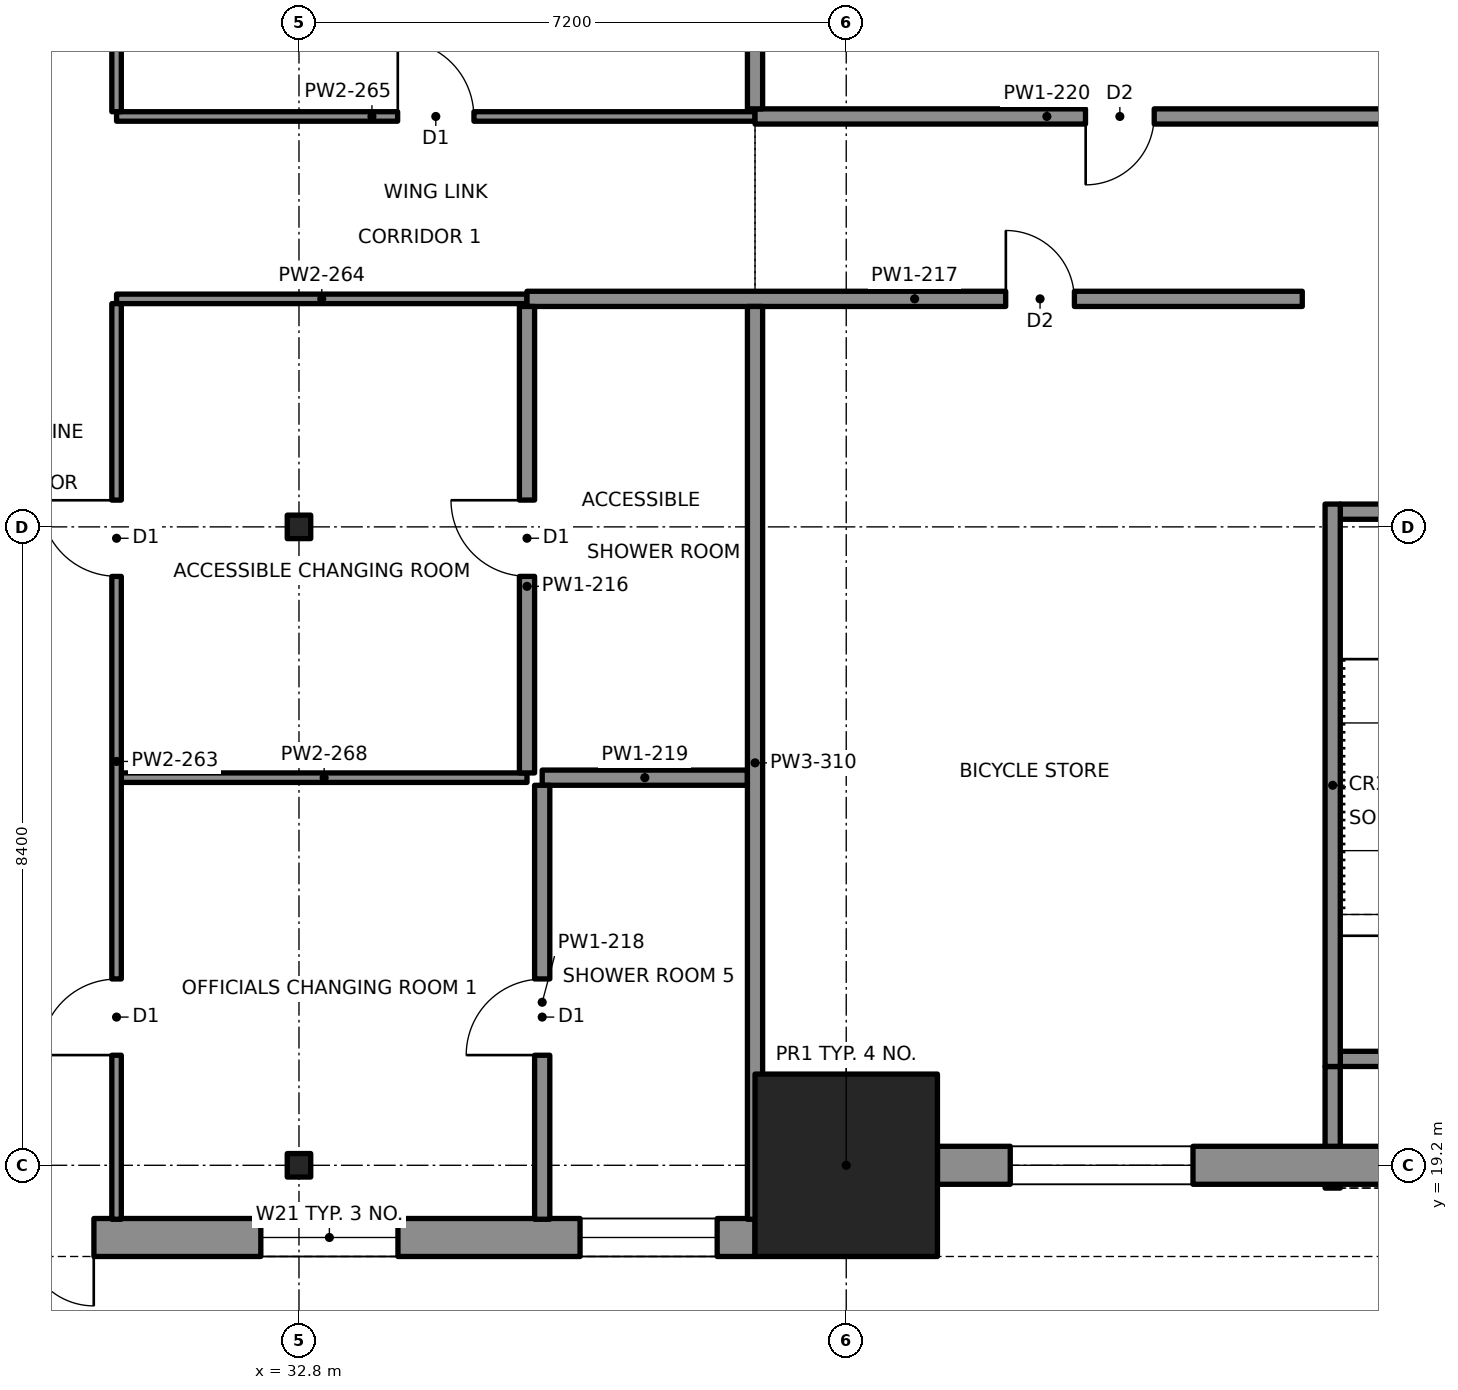
"""IFC4 building model, lengths in metres.
Left out: names, types, materials, properties, quantities, classifications, styles, units other than length and angle.
Written with IfcOpenShell. Run it as: python <this file> out.ifc"""

import sys

from ifc_helpers import new_model, si_unit, direction, frame, frame_2d, origin, origin_2d, place, context, subcontext, project, spatial, rectangle, i_section, extrude, element, fill, save


model = new_model("IFC4")
c1 = context("Model", 3, precision=1e-05, world=origin(), true_north=direction((0.0, 1.0)))
c2 = subcontext(c1, "Body", "Model", "MODEL_VIEW")
j1 = project(units=[si_unit("LENGTHUNIT", "METRE"), si_unit("PLANEANGLEUNIT", "RADIAN")], contexts=[c1])
p1 = place(None, origin())
s1 = spatial("IfcSite", under=j1, at=p1, CompositionType="ELEMENT")
p2 = place(p1, origin())
s2 = spatial("IfcBuilding", under=s1, at=p2, CompositionType="ELEMENT")
p3 = place(p2, origin())
s3 = spatial("IfcBuildingStorey", under=s2, at=p3, CompositionType="ELEMENT", Elevation=0.0)
p4 = place(p3, frame((40.0, 19.2, -0.9), z_axis=(0.0, 0.0, 1.0), x_axis=(1.0, 0.0, 0.0)))
e1 = element("IfcColumn", 1, at=p4, inside=s3, PredefinedType="COLUMN", context=c2, shape_type="SweptSolid", body=[
    extrude(rectangle(XDim=2.4, YDim=2.4, at=origin_2d()), origin(), (0.0, 0.0, 1.0), 5.3),
])
for number, where, z_axis, x_axis in (
    (2, (32.8, 19.2, -0.9), (0.0, 0.0, 1.0), (1.0, 0.0, 0.0)),
    (3, (32.8, 27.6, -0.9), (0.0, 0.0, 1.0), (1.0, 0.0, 0.0)),
):
    element("IfcColumn", number, at=place(p3, frame(where, z_axis=z_axis, x_axis=x_axis)), inside=s3, PredefinedType="COLUMN", context=c2, shape_type="SweptSolid", body=[
        extrude(i_section(OverallWidth=0.309, OverallDepth=0.323, WebThickness=0.014, FlangeThickness=0.023, at=origin_2d()), origin(), (0.0, 0.0, 1.0), 5.3),
    ])
p5 = place(p3, frame((41.2, 19.2, 0.0), z_axis=(0.0, 0.0, 1.0), x_axis=(1.0, 0.0, 0.0)))
e4 = element("IfcWall", 4, at=p5, inside=s3, PredefinedType="SOLIDWALL", context=c2, shape_type="SweptSolid", body=[
    extrude(rectangle(XDim=14.4, YDim=0.5, at=frame_2d((7.2, 0.0))), origin(), (0.0, 0.0, 1.0), 3.65),
])
p6 = place(p5, frame((0.96, 0.0, 0.9)))
e5 = element("IfcOpeningElement", 5, at=p6, cuts=e4, PredefinedType="OPENING", context=c2, shape_type="SweptSolid", body=[
    extrude(rectangle(XDim=2.4, YDim=1.8, at=frame_2d((1.2, 0.9))), frame((0.0, 0.26, 0.0), z_axis=(0.0, -1.0, 0.0), x_axis=(1.0, 0.0, 0.0)), (0.0, 0.0, 1.0), 0.52),
])
p7 = place(p5, frame((11.04, 0.0, 0.9)))
e6 = element("IfcOpeningElement", 6, at=p7, cuts=e4, PredefinedType="OPENING", context=c2, shape_type="SweptSolid", body=[
    extrude(rectangle(XDim=2.4, YDim=1.8, at=frame_2d((1.2, 0.9))), frame((0.0, 0.26, 0.0), z_axis=(0.0, -1.0, 0.0), x_axis=(1.0, 0.0, 0.0)), (0.0, 0.0, 1.0), 0.52),
])
p8 = place(p5, frame((6.3, 0.0, 0.0)))
e7 = element("IfcOpeningElement", 7, at=p8, cuts=e4, PredefinedType="OPENING", context=c2, shape_type="SweptSolid", body=[
    extrude(rectangle(XDim=1.8, YDim=2.4, at=frame_2d((0.9, 1.2))), frame((0.0, 0.26, 0.0), z_axis=(0.0, -1.0, 0.0), x_axis=(1.0, 0.0, 0.0)), (0.0, 0.0, 1.0), 0.52),
])
p9 = place(p3, frame((17.2, 18.25, 0.0), z_axis=(0.0, 0.0, 1.0), x_axis=(1.0, 0.0, 0.0)))
e8 = element("IfcWall", 8, at=p9, inside=s3, PredefinedType="SOLIDWALL", context=c2, shape_type="SweptSolid", body=[
    extrude(rectangle(XDim=21.6, YDim=0.5, at=frame_2d((10.8, 0.0))), origin(), (0.0, 0.0, 1.0), 4.4),
])
p10 = place(p9, frame((6.9, 0.0, 0.9)))
e9 = element("IfcOpeningElement", 9, at=p10, cuts=e8, PredefinedType="OPENING", context=c2, shape_type="SweptSolid", body=[
    extrude(rectangle(XDim=1.8, YDim=2.0, at=frame_2d((0.9, 1.0))), frame((0.0, 0.26, 0.0), z_axis=(0.0, -1.0, 0.0), x_axis=(1.0, 0.0, 0.0)), (0.0, 0.0, 1.0), 0.52),
])
p11 = place(p9, frame((15.1, 0.0, 0.9)))
e10 = element("IfcOpeningElement", 10, at=p11, cuts=e8, PredefinedType="OPENING", context=c2, shape_type="SweptSolid", body=[
    extrude(rectangle(XDim=1.8, YDim=2.0, at=frame_2d((0.9, 1.0))), frame((0.0, 0.26, 0.0), z_axis=(0.0, -1.0, 0.0), x_axis=(1.0, 0.0, 0.0)), (0.0, 0.0, 1.0), 0.52),
])
p12 = place(p9, frame((19.3, 0.0, 0.9)))
e11 = element("IfcOpeningElement", 11, at=p12, cuts=e8, PredefinedType="OPENING", context=c2, shape_type="SweptSolid", body=[
    extrude(rectangle(XDim=1.8, YDim=2.0, at=frame_2d((0.9, 1.0))), frame((0.0, 0.26, 0.0), z_axis=(0.0, -1.0, 0.0), x_axis=(1.0, 0.0, 0.0)), (0.0, 0.0, 1.0), 0.52),
])
p13 = place(p9, frame((3.7, 0.0, 0.0)))
e12 = element("IfcOpeningElement", 12, at=p13, cuts=e8, PredefinedType="OPENING", context=c2, shape_type="SweptSolid", body=[
    extrude(rectangle(XDim=2.2, YDim=2.4, at=frame_2d((1.1, 1.2))), frame((0.0, 0.26, 0.0), z_axis=(0.0, -1.0, 0.0), x_axis=(1.0, 0.0, 0.0)), (0.0, 0.0, 1.0), 0.52),
])
p14 = place(p9, frame((11.1, 0.0, 0.0)))
e13 = element("IfcOpeningElement", 13, at=p14, cuts=e8, PredefinedType="OPENING", context=c2, shape_type="SweptSolid", body=[
    extrude(rectangle(XDim=1.8, YDim=2.4, at=frame_2d((0.9, 1.2))), frame((0.0, 0.26, 0.0), z_axis=(0.0, -1.0, 0.0), x_axis=(1.0, 0.0, 0.0)), (0.0, 0.0, 1.0), 0.52),
])
p15 = place(p3, frame((46.4, 20.5, 0.0), z_axis=(0.0, 0.0, 1.0), x_axis=(0.0, 1.0, 0.0)))
e14 = element("IfcWall", 14, at=p15, inside=s3, PredefinedType="SOLIDWALL", context=c2, shape_type="SweptSolid", body=[
    extrude(rectangle(XDim=7.4, YDim=0.2, at=frame_2d((3.7, 0.0))), origin(), (0.0, 0.0, 1.0), 4.4),
])
p16 = place(p3, frame((46.5, 20.6, 0.0), z_axis=(0.0, 0.0, 1.0), x_axis=(1.0, 0.0, 0.0)))
e15 = element("IfcWall", 15, at=p16, inside=s3, PredefinedType="SOLIDWALL", context=c2, shape_type="SweptSolid", body=[
    extrude(rectangle(XDim=3.8, YDim=0.2, at=frame_2d((1.9, 0.0))), origin(), (0.0, 0.0, 1.0), 4.4),
])
p17 = place(p16, frame((1.05, 0.0, 0.0)))
e16 = element("IfcOpeningElement", 16, at=p17, cuts=e15, PredefinedType="OPENING", context=c2, shape_type="SweptSolid", body=[
    extrude(rectangle(XDim=1.7, YDim=2.1, at=frame_2d((0.85, 1.05))), frame((0.0, 0.11, 0.0), z_axis=(0.0, -1.0, 0.0), x_axis=(1.0, 0.0, 0.0)), (0.0, 0.0, 1.0), 0.22),
])
p18 = place(p3, frame((46.5, 27.8, 0.0), z_axis=(0.0, 0.0, 1.0), x_axis=(1.0, 0.0, 0.0)))
e17 = element("IfcWall", 17, at=p18, inside=s3, PredefinedType="SOLIDWALL", context=c2, shape_type="SweptSolid", body=[
    extrude(rectangle(XDim=3.8, YDim=0.2, at=frame_2d((1.9, 0.0))), origin(), (0.0, 0.0, 1.0), 4.4),
])
p19 = place(p3, frame((46.4, 18.9, 0.0), z_axis=(0.0, 0.0, 1.0), x_axis=(0.0, 1.0, 0.0)))
e18 = element("IfcWall", 18, at=p19, inside=s3, PredefinedType="SOLIDWALL", context=c2, shape_type="SweptSolid", body=[
    extrude(rectangle(XDim=1.6, YDim=0.2, at=frame_2d((0.8, 0.0))), origin(), (0.0, 0.0, 1.0), 4.4),
])
p20 = place(p3, frame((30.462, 24.3, 0.0), z_axis=(0.0, 0.0, 1.0), x_axis=(1.0, 0.0, 0.0)))
e19 = element("IfcWall", 19, at=p20, inside=s3, PredefinedType="PARTITIONING", context=c2, shape_type="SweptSolid", body=[
    extrude(rectangle(XDim=5.338, YDim=0.125, at=frame_2d((2.669, 0.0))), origin(), (0.0, 0.0, 1.0), 3.65),
])
p21 = place(p3, frame((36.0, 24.3, 0.0), z_axis=(0.0, 0.0, 1.0), x_axis=(1.0, 0.0, 0.0)))
e20 = element("IfcWall", 20, at=p21, inside=s3, PredefinedType="PARTITIONING", context=c2, shape_type="SweptSolid", body=[
    extrude(rectangle(XDim=2.7, YDim=0.2, at=frame_2d((1.35, 0.0))), origin(), (0.0, 0.0, 1.0), 3.65),
])
p22 = place(p3, frame((30.4, 30.6, 0.0), z_axis=(0.0, 0.0, 1.0), x_axis=(1.0, 0.0, 0.0)))
e21 = element("IfcWall", 21, at=p22, inside=s3, PredefinedType="PARTITIONING", context=c2, shape_type="SweptSolid", body=[
    extrude(rectangle(XDim=5.4, YDim=0.125, at=frame_2d((2.7, 0.0))), origin(), (0.0, 0.0, 1.0), 3.65),
])
p23 = place(p3, frame((35.8, 30.6, 0.0), z_axis=(0.0, 0.0, 1.0), x_axis=(1.0, 0.0, 0.0)))
e22 = element("IfcWall", 22, at=p23, inside=s3, PredefinedType="PARTITIONING", context=c2, shape_type="SweptSolid", body=[
    extrude(rectangle(XDim=10.2, YDim=0.2, at=frame_2d((5.1, 0.0))), origin(), (0.0, 0.0, 1.0), 3.65),
])
p24 = place(p23, frame((6.3, 0.0, 0.0)))
e23 = element("IfcOpeningElement", 23, at=p24, cuts=e22, PredefinedType="OPENING", context=c2, shape_type="SweptSolid", body=[
    extrude(rectangle(XDim=0.9, YDim=2.1, at=frame_2d((0.45, 1.05))), frame((0.0, 0.11, 0.0), z_axis=(0.0, -1.0, 0.0), x_axis=(1.0, 0.0, 0.0)), (0.0, 0.0, 1.0), 0.22),
])
p25 = place(p3, frame((30.4, 33.0, 0.0), z_axis=(0.0, 0.0, 1.0), x_axis=(1.0, 0.0, 0.0)))
e24 = element("IfcWall", 24, at=p25, inside=s3, PredefinedType="PARTITIONING", context=c2, shape_type="SweptSolid", body=[
    extrude(rectangle(XDim=8.4, YDim=0.125, at=frame_2d((4.2, 0.0))), origin(), (0.0, 0.0, 1.0), 3.65),
])
p26 = place(p25, frame((3.7, 0.0, 0.0)))
e25 = element("IfcOpeningElement", 25, at=p26, cuts=e24, PredefinedType="OPENING", context=c2, shape_type="SweptSolid", body=[
    extrude(rectangle(XDim=1.0, YDim=2.1, at=frame_2d((0.5, 1.05))), frame((0.0, 0.073, 0.0), z_axis=(0.0, -1.0, 0.0), x_axis=(1.0, 0.0, 0.0)), (0.0, 0.0, 1.0), 0.145),
])
p27 = place(p3, frame((38.8, 33.0, 0.0), z_axis=(0.0, 0.0, 1.0), x_axis=(1.0, 0.0, 0.0)))
e26 = element("IfcWall", 26, at=p27, inside=s3, PredefinedType="PARTITIONING", context=c2, shape_type="SweptSolid", body=[
    extrude(rectangle(XDim=9.6, YDim=0.2, at=frame_2d((4.8, 0.0))), origin(), (0.0, 0.0, 1.0), 3.65),
])
p28 = place(p27, frame((4.35, 0.0, 0.0)))
e27 = element("IfcOpeningElement", 27, at=p28, cuts=e26, PredefinedType="OPENING", context=c2, shape_type="SweptSolid", body=[
    extrude(rectangle(XDim=0.9, YDim=2.1, at=frame_2d((0.45, 1.05))), frame((0.0, 0.11, 0.0), z_axis=(0.0, -1.0, 0.0), x_axis=(1.0, 0.0, 0.0)), (0.0, 0.0, 1.0), 0.22),
])
p29 = place(p3, frame((30.4, 18.49, 0.0), z_axis=(0.0, 0.0, 1.0), x_axis=(0.0, 1.0, 0.0)))
e28 = element("IfcWall", 28, at=p29, inside=s3, PredefinedType="PARTITIONING", context=c2, shape_type="SweptSolid", body=[
    extrude(rectangle(XDim=12.048, YDim=0.125, at=frame_2d((6.024, 0.0))), origin(), (0.0, 0.0, 1.0), 3.65),
])
p30 = place(p29, frame((2.16, 0.0, 0.0)))
e29 = element("IfcOpeningElement", 29, at=p30, cuts=e28, PredefinedType="OPENING", context=c2, shape_type="SweptSolid", body=[
    extrude(rectangle(XDim=1.0, YDim=2.1, at=frame_2d((0.5, 1.05))), frame((0.0, 0.073, 0.0), z_axis=(0.0, -1.0, 0.0), x_axis=(1.0, 0.0, 0.0)), (0.0, 0.0, 1.0), 0.145),
])
p31 = place(p29, frame((8.46, 0.0, 0.0)))
e30 = element("IfcOpeningElement", 30, at=p31, cuts=e28, PredefinedType="OPENING", context=c2, shape_type="SweptSolid", body=[
    extrude(rectangle(XDim=1.0, YDim=2.1, at=frame_2d((0.5, 1.05))), frame((0.0, 0.073, 0.0), z_axis=(0.0, -1.0, 0.0), x_axis=(1.0, 0.0, 0.0)), (0.0, 0.0, 1.0), 0.145),
])
p32 = place(p3, frame((30.4, 33.062, 0.0), z_axis=(0.0, 0.0, 1.0), x_axis=(0.0, 1.0, 0.0)))
e31 = element("IfcWall", 31, at=p32, inside=s3, PredefinedType="PARTITIONING", context=c2, shape_type="SweptSolid", body=[
    extrude(rectangle(XDim=5.875, YDim=0.125, at=frame_2d((2.938, 0.0))), origin(), (0.0, 0.0, 1.0), 3.65),
])
p33 = place(p3, frame((35.8, 24.363, 0.0), z_axis=(0.0, 0.0, 1.0), x_axis=(0.0, 1.0, 0.0)))
e32 = element("IfcWall", 32, at=p33, inside=s3, PredefinedType="PARTITIONING", context=c2, shape_type="SweptSolid", body=[
    extrude(rectangle(XDim=6.137, YDim=0.2, at=frame_2d((3.069, 0.0))), origin(), (0.0, 0.0, 1.0), 3.65),
])
p34 = place(p33, frame((2.588, 0.0, 0.0)))
e33 = element("IfcOpeningElement", 33, at=p34, cuts=e32, PredefinedType="OPENING", context=c2, shape_type="SweptSolid", body=[
    extrude(rectangle(XDim=1.0, YDim=2.1, at=frame_2d((0.5, 1.05))), frame((0.0, 0.11, 0.0), z_axis=(0.0, -1.0, 0.0), x_axis=(1.0, 0.0, 0.0)), (0.0, 0.0, 1.0), 0.22),
])
p35 = place(p3, frame((36.0, 18.49, 0.0), z_axis=(0.0, 0.0, 1.0), x_axis=(0.0, 1.0, 0.0)))
e34 = element("IfcWall", 34, at=p35, inside=s3, PredefinedType="PARTITIONING", context=c2, shape_type="SweptSolid", body=[
    extrude(rectangle(XDim=5.71, YDim=0.2, at=frame_2d((2.855, 0.0))), origin(), (0.0, 0.0, 1.0), 3.65),
])
p36 = place(p35, frame((2.16, 0.0, 0.0)))
e35 = element("IfcOpeningElement", 35, at=p36, cuts=e34, PredefinedType="OPENING", context=c2, shape_type="SweptSolid", body=[
    extrude(rectangle(XDim=1.0, YDim=2.1, at=frame_2d((0.5, 1.05))), frame((0.0, 0.11, 0.0), z_axis=(0.0, -1.0, 0.0), x_axis=(1.0, 0.0, 0.0)), (0.0, 0.0, 1.0), 0.22),
])
p37 = place(p3, frame((38.8, 18.49, 0.0), z_axis=(0.0, 0.0, 1.0), x_axis=(0.0, 1.0, 0.0)))
e36 = element("IfcWall", 36, at=p37, inside=s3, PredefinedType="PARTITIONING", context=c2, shape_type="SweptSolid", body=[
    extrude(rectangle(XDim=12.01, YDim=0.2, at=frame_2d((6.005, 0.0))), origin(), (0.0, 0.0, 1.0), 3.65),
])
p38 = place(p3, frame((38.8, 33.1, 0.0), z_axis=(0.0, 0.0, 1.0), x_axis=(0.0, 1.0, 0.0)))
e37 = element("IfcWall", 37, at=p38, inside=s3, PredefinedType="PARTITIONING", context=c2, shape_type="SweptSolid", body=[
    extrude(rectangle(XDim=5.8, YDim=0.2, at=frame_2d((2.9, 0.0))), origin(), (0.0, 0.0, 1.0), 3.65),
])
p39 = place(p6, origin())
e38 = element("IfcWindow", 38, at=p39, inside=s3, PartitioningType="SINGLE_PANEL", PredefinedType="WINDOW", context=c2, shape_type="SweptSolid", body=[
    extrude(rectangle(XDim=2.4, YDim=1.8, at=frame_2d((1.2, 0.9))), frame((0.0, 0.03, 0.0), z_axis=(0.0, -1.0, 0.0), x_axis=(1.0, 0.0, 0.0)), (0.0, 0.0, 1.0), 0.06),
])
fill(e5, e38)
p40 = place(p11, origin())
e39 = element("IfcWindow", 39, at=p40, inside=s3, PartitioningType="SINGLE_PANEL", PredefinedType="WINDOW", context=c2, shape_type="SweptSolid", body=[
    extrude(rectangle(XDim=1.8, YDim=2.0, at=frame_2d((0.9, 1.0))), frame((0.0, 0.03, 0.0), z_axis=(0.0, -1.0, 0.0), x_axis=(1.0, 0.0, 0.0)), (0.0, 0.0, 1.0), 0.06),
])
fill(e10, e39)
p41 = place(p12, origin())
e40 = element("IfcWindow", 40, at=p41, inside=s3, PartitioningType="SINGLE_PANEL", PredefinedType="WINDOW", context=c2, shape_type="SweptSolid", body=[
    extrude(rectangle(XDim=1.8, YDim=2.0, at=frame_2d((0.9, 1.0))), frame((0.0, 0.03, 0.0), z_axis=(0.0, -1.0, 0.0), x_axis=(1.0, 0.0, 0.0)), (0.0, 0.0, 1.0), 0.06),
])
fill(e11, e40)
p42 = place(p14, origin())
e41 = element("IfcDoor", 41, at=p42, inside=s3, OperationType="DOUBLE_DOOR_SINGLE_SWING", PredefinedType="DOOR", context=c2, shape_type="SweptSolid", body=[
    extrude(rectangle(XDim=1.8, YDim=2.4, at=frame_2d((0.9, 1.2))), frame((0.0, 0.025, 0.0), z_axis=(0.0, -1.0, 0.0), x_axis=(1.0, 0.0, 0.0)), (0.0, 0.0, 1.0), 0.05),
])
fill(e13, e41)
p43 = place(p30, origin())
e42 = element("IfcDoor", 42, at=p43, inside=s3, OperationType="SINGLE_SWING_LEFT", PredefinedType="DOOR", context=c2, shape_type="SweptSolid", body=[
    extrude(rectangle(XDim=1.0, YDim=2.1, at=frame_2d((0.5, 1.05))), frame((0.0, 0.025, 0.0), z_axis=(0.0, -1.0, 0.0), x_axis=(1.0, 0.0, 0.0)), (0.0, 0.0, 1.0), 0.05),
])
fill(e29, e42)
p44 = place(p36, origin())
e43 = element("IfcDoor", 43, at=p44, inside=s3, OperationType="SINGLE_SWING_LEFT", PredefinedType="DOOR", context=c2, shape_type="SweptSolid", body=[
    extrude(rectangle(XDim=1.0, YDim=2.1, at=frame_2d((0.5, 1.05))), frame((0.0, 0.025, 0.0), z_axis=(0.0, -1.0, 0.0), x_axis=(1.0, 0.0, 0.0)), (0.0, 0.0, 1.0), 0.05),
])
fill(e35, e43)
p45 = place(p31, origin())
e44 = element("IfcDoor", 44, at=p45, inside=s3, OperationType="SINGLE_SWING_RIGHT", PredefinedType="DOOR", context=c2, shape_type="SweptSolid", body=[
    extrude(rectangle(XDim=1.0, YDim=2.1, at=frame_2d((0.5, 1.05))), frame((0.0, 0.025, 0.0), z_axis=(0.0, -1.0, 0.0), x_axis=(1.0, 0.0, 0.0)), (0.0, 0.0, 1.0), 0.05),
])
fill(e30, e44)
p46 = place(p34, origin())
e45 = element("IfcDoor", 45, at=p46, inside=s3, OperationType="SINGLE_SWING_RIGHT", PredefinedType="DOOR", context=c2, shape_type="SweptSolid", body=[
    extrude(rectangle(XDim=1.0, YDim=2.1, at=frame_2d((0.5, 1.05))), frame((0.0, 0.025, 0.0), z_axis=(0.0, -1.0, 0.0), x_axis=(1.0, 0.0, 0.0)), (0.0, 0.0, 1.0), 0.05),
])
fill(e33, e45)
p47 = place(p26, origin())
e46 = element("IfcDoor", 46, at=p47, inside=s3, OperationType="SINGLE_SWING_LEFT", PredefinedType="DOOR", context=c2, shape_type="SweptSolid", body=[
    extrude(rectangle(XDim=1.0, YDim=2.1, at=frame_2d((0.5, 1.05))), frame((0.0, 0.025, 0.0), z_axis=(0.0, -1.0, 0.0), x_axis=(1.0, 0.0, 0.0)), (0.0, 0.0, 1.0), 0.05),
])
fill(e25, e46)
p48 = place(p24, origin())
e47 = element("IfcDoor", 47, at=p48, inside=s3, OperationType="SINGLE_SWING_LEFT", PredefinedType="DOOR", context=c2, shape_type="SweptSolid", body=[
    extrude(rectangle(XDim=0.9, YDim=2.1, at=frame_2d((0.45, 1.05))), frame((0.0, 0.025, 0.0), z_axis=(0.0, -1.0, 0.0), x_axis=(1.0, 0.0, 0.0)), (0.0, 0.0, 1.0), 0.05),
])
fill(e23, e47)
p49 = place(p28, origin())
e48 = element("IfcDoor", 48, at=p49, inside=s3, OperationType="SINGLE_SWING_LEFT", PredefinedType="DOOR", context=c2, shape_type="SweptSolid", body=[
    extrude(rectangle(XDim=0.9, YDim=2.1, at=frame_2d((0.45, 1.05))), frame((0.0, 0.025, 0.0), z_axis=(0.0, -1.0, 0.0), x_axis=(1.0, 0.0, 0.0)), (0.0, 0.0, 1.0), 0.05),
])
fill(e27, e48)
save(model, sys.argv[1])
